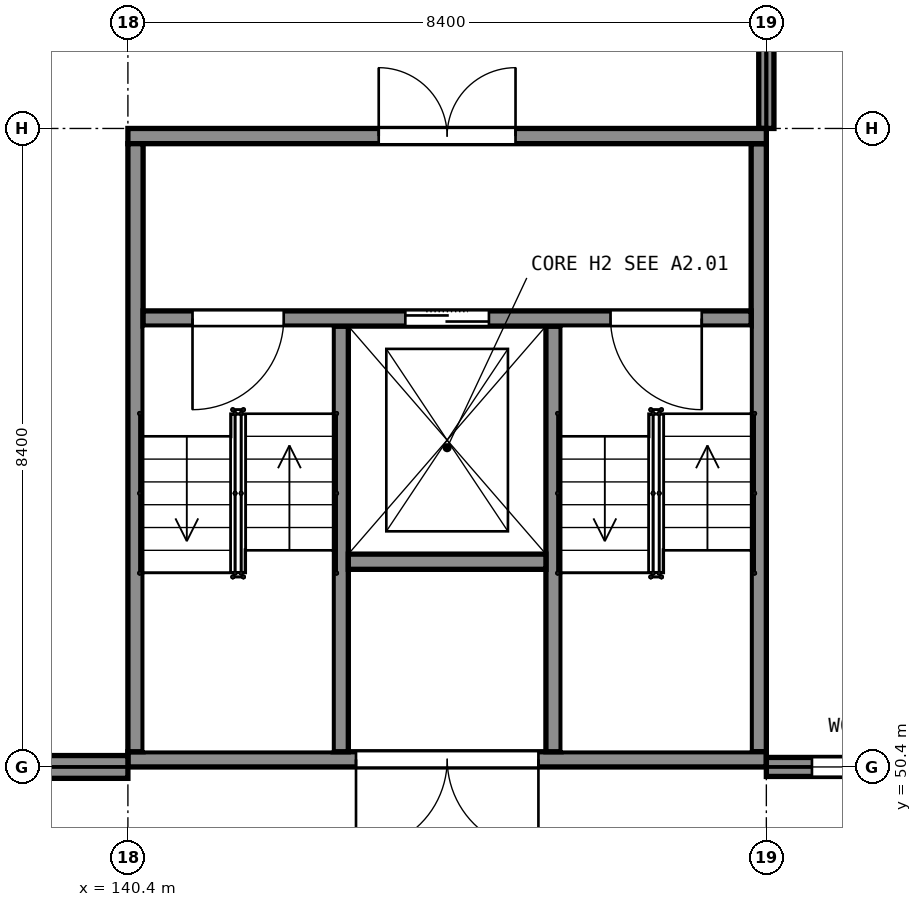
"""IFC4 building model, lengths in metres.
Left out: names, types, materials, properties, quantities, classifications, styles, units other than length and angle.
Written with IfcOpenShell. Run it as: python <this file> out.ifc"""

import sys

from ifc_helpers import new_model, si_unit, direction, frame, frame_2d, origin, place, context, subcontext, project, spatial, rectangle, extrude, element, fill, save


model = new_model("IFC4")
c1 = context("Model", 3, precision=1e-05, world=origin(), true_north=direction((0.0, 1.0)))
c2 = subcontext(c1, "Body", "Model", "MODEL_VIEW")
j1 = project(units=[si_unit("LENGTHUNIT", "METRE"), si_unit("PLANEANGLEUNIT", "RADIAN")], contexts=[c1])
p1 = place(None, origin())
s1 = spatial("IfcSite", under=j1, at=p1, CompositionType="ELEMENT")
p2 = place(p1, origin())
s2 = spatial("IfcBuilding", under=s1, at=p2, CompositionType="ELEMENT")
p3 = place(p2, origin())
s3 = spatial("IfcBuildingStorey", under=s2, at=p3, CompositionType="ELEMENT", Elevation=0.0)
p4 = place(p3, frame((148.8, 50.5, -1.8), z_axis=(0.0, 0.0, 1.0), x_axis=(-1.0, 0.0, 0.0)))
e1 = element("IfcWall", 1, at=p4, inside=s3, PredefinedType="SHEAR", context=c2, shape_type="SweptSolid", body=[
    extrude(rectangle(XDim=8.4, YDim=0.2, at=frame_2d((4.2, 0.0))), origin(), (0.0, 0.0, 1.0), 7.3),
])
p5 = place(p4, frame((2.999, 0.0, 1.8)))
e2 = element("IfcOpeningElement", 2, at=p5, cuts=e1, PredefinedType="OPENING", context=c2, shape_type="SweptSolid", body=[
    extrude(rectangle(XDim=2.4, YDim=2.1, at=frame_2d((1.2, 1.05))), frame((0.0, 0.11, 0.0), z_axis=(0.0, -1.0, 0.0), x_axis=(1.0, 0.0, 0.0)), (0.0, 0.0, 1.0), 0.22),
])
p6 = place(p3, frame((140.4, 58.7, -1.8), z_axis=(0.0, 0.0, 1.0), x_axis=(1.0, 0.0, 0.0)))
e3 = element("IfcWall", 3, at=p6, inside=s3, PredefinedType="SHEAR", context=c2, shape_type="SweptSolid", body=[
    extrude(rectangle(XDim=8.4, YDim=0.2, at=frame_2d((4.2, 0.0))), origin(), (0.0, 0.0, 1.0), 7.3),
])
p7 = place(p6, frame((3.3, 0.0, 1.8)))
e4 = element("IfcOpeningElement", 4, at=p7, cuts=e3, PredefinedType="OPENING", context=c2, shape_type="SweptSolid", body=[
    extrude(rectangle(XDim=1.8, YDim=2.1, at=frame_2d((0.9, 1.05))), frame((0.0, 0.11, 0.0), z_axis=(0.0, -1.0, 0.0), x_axis=(1.0, 0.0, 0.0)), (0.0, 0.0, 1.0), 0.22),
])
for number, where, z_axis, x_axis in (
    (5, (140.5, 50.6, -1.8), (0.0, 0.0, 1.0), (0.0, 1.0, 0.0)),
    (6, (148.7, 50.6, -1.8), (0.0, 0.0, 1.0), (0.0, 1.0, 0.0)),
):
    element("IfcWall", number, at=place(p3, frame(where, z_axis=z_axis, x_axis=x_axis)), inside=s3, PredefinedType="SHEAR", context=c2, shape_type="SweptSolid", body=[
        extrude(rectangle(XDim=8.0, YDim=0.2, at=frame_2d((4.0, 0.0))), origin(), (0.0, 0.0, 1.0), 7.3),
    ])
p8 = place(p3, frame((140.6, 56.3, -1.8), z_axis=(0.0, 0.0, 1.0), x_axis=(1.0, 0.0, 0.0)))
e7 = element("IfcWall", 7, at=p8, inside=s3, PredefinedType="SHEAR", context=c2, shape_type="SweptSolid", body=[
    extrude(rectangle(XDim=8.0, YDim=0.2, at=frame_2d((4.0, 0.0))), origin(), (0.0, 0.0, 1.0), 7.3),
])
p9 = place(p8, frame((0.65, 0.0, 1.8)))
e8 = element("IfcOpeningElement", 8, at=p9, cuts=e7, PredefinedType="OPENING", context=c2, shape_type="SweptSolid", body=[
    extrude(rectangle(XDim=1.2, YDim=2.1, at=frame_2d((0.6, 1.05))), frame((0.0, 0.11, 0.0), z_axis=(0.0, -1.0, 0.0), x_axis=(1.0, 0.0, 0.0)), (0.0, 0.0, 1.0), 0.22),
])
p10 = place(p8, frame((6.15, 0.0, 1.8)))
e9 = element("IfcOpeningElement", 9, at=p10, cuts=e7, PredefinedType="OPENING", context=c2, shape_type="SweptSolid", body=[
    extrude(rectangle(XDim=1.2, YDim=2.1, at=frame_2d((0.6, 1.05))), frame((0.0, 0.11, 0.0), z_axis=(0.0, -1.0, 0.0), x_axis=(1.0, 0.0, 0.0)), (0.0, 0.0, 1.0), 0.22),
])
p11 = place(p8, frame((3.45, 0.0, 1.8)))
e10 = element("IfcOpeningElement", 10, at=p11, cuts=e7, PredefinedType="OPENING", context=c2, shape_type="SweptSolid", body=[
    extrude(rectangle(XDim=1.1, YDim=2.1, at=frame_2d((0.55, 1.05))), frame((0.0, 0.11, 0.0), z_axis=(0.0, -1.0, 0.0), x_axis=(1.0, 0.0, 0.0)), (0.0, 0.0, 1.0), 0.22),
])
for number, where, z_axis, x_axis in (
    (11, (143.2, 50.6, -1.8), (0.0, 0.0, 1.0), (0.0, 1.0, 0.0)),
    (12, (146.0, 50.6, -1.8), (0.0, 0.0, 1.0), (0.0, 1.0, 0.0)),
):
    element("IfcWall", number, at=place(p3, frame(where, z_axis=z_axis, x_axis=x_axis)), inside=s3, PredefinedType="SHEAR", context=c2, shape_type="SweptSolid", body=[
        extrude(rectangle(XDim=5.6, YDim=0.2, at=frame_2d((2.8, 0.0))), origin(), (0.0, 0.0, 1.0), 7.3),
    ])
p12 = place(p3, frame((143.3, 53.1, -1.8), z_axis=(0.0, 0.0, 1.0), x_axis=(1.0, 0.0, 0.0)))
e13 = element("IfcWall", 13, at=p12, inside=s3, PredefinedType="SHEAR", context=c2, shape_type="SweptSolid", body=[
    extrude(rectangle(XDim=2.6, YDim=0.2, at=frame_2d((1.3, 0.0))), origin(), (0.0, 0.0, 1.0), 7.3),
])
p13 = place(p3, frame((132.4, 50.4, 0.0), z_axis=(0.0, 0.0, 1.0), x_axis=(1.0, 0.0, 0.0)))
e14 = element("IfcWall", 14, at=p13, inside=s3, PredefinedType="SOLIDWALL", context=c2, shape_type="SweptSolid", body=[
    extrude(rectangle(XDim=8.0, YDim=0.3, at=frame_2d((4.0, 0.0))), origin(), (0.0, 0.0, 1.0), 4.44),
])
p14 = place(p13, frame((2.3, 0.0, 1.5)))
e15 = element("IfcOpeningElement", 15, at=p14, cuts=e14, PredefinedType="OPENING", context=c2, shape_type="SweptSolid", body=[
    extrude(rectangle(XDim=0.6, YDim=2.4, at=frame_2d((0.3, 1.2))), frame((0.0, 0.16, 0.0), z_axis=(0.0, -1.0, 0.0), x_axis=(1.0, 0.0, 0.0)), (0.0, 0.0, 1.0), 0.32),
])
p15 = place(p13, frame((5.1, 0.0, 1.5)))
e16 = element("IfcOpeningElement", 16, at=p15, cuts=e14, PredefinedType="OPENING", context=c2, shape_type="SweptSolid", body=[
    extrude(rectangle(XDim=0.6, YDim=2.4, at=frame_2d((0.3, 1.2))), frame((0.0, 0.16, 0.0), z_axis=(0.0, -1.0, 0.0), x_axis=(1.0, 0.0, 0.0)), (0.0, 0.0, 1.0), 0.32),
])
p16 = place(p3, frame((148.8, 50.4, 0.0), z_axis=(0.0, 0.0, 1.0), x_axis=(1.0, 0.0, 0.0)))
e17 = element("IfcWall", 17, at=p16, inside=s3, PredefinedType="SOLIDWALL", context=c2, shape_type="SweptSolid", body=[
    extrude(rectangle(XDim=8.0, YDim=0.25, at=frame_2d((4.0, 0.0))), origin(), (0.0, 0.0, 1.0), 4.44),
])
p17 = place(p16, frame((0.6, 0.0, 0.9)))
e18 = element("IfcOpeningElement", 18, at=p17, cuts=e17, PredefinedType="OPENING", context=c2, shape_type="SweptSolid", body=[
    extrude(rectangle(XDim=1.2, YDim=2.1, at=frame_2d((0.6, 1.05))), frame((0.0, 0.135, 0.0), z_axis=(0.0, -1.0, 0.0), x_axis=(1.0, 0.0, 0.0)), (0.0, 0.0, 1.0), 0.27),
])
p18 = place(p16, frame((3.4, 0.0, 0.9)))
e19 = element("IfcOpeningElement", 19, at=p18, cuts=e17, PredefinedType="OPENING", context=c2, shape_type="SweptSolid", body=[
    extrude(rectangle(XDim=1.2, YDim=2.1, at=frame_2d((0.6, 1.05))), frame((0.0, 0.135, 0.0), z_axis=(0.0, -1.0, 0.0), x_axis=(1.0, 0.0, 0.0)), (0.0, 0.0, 1.0), 0.27),
])
p19 = place(p16, frame((6.2, 0.0, 0.9)))
e20 = element("IfcOpeningElement", 20, at=p19, cuts=e17, PredefinedType="OPENING", context=c2, shape_type="SweptSolid", body=[
    extrude(rectangle(XDim=1.2, YDim=2.1, at=frame_2d((0.6, 1.05))), frame((0.0, 0.135, 0.0), z_axis=(0.0, -1.0, 0.0), x_axis=(1.0, 0.0, 0.0)), (0.0, 0.0, 1.0), 0.27),
])
p20 = place(p3, frame((148.8, 58.8, 0.0), z_axis=(0.0, 0.0, 1.0), x_axis=(0.0, 1.0, 0.0)))
e21 = element("IfcWall", 21, at=p20, inside=s3, PredefinedType="PARTITIONING", context=c2, shape_type="SweptSolid", body=[
    extrude(rectangle(XDim=8.0, YDim=0.2, at=frame_2d((4.0, 0.0))), origin(), (0.0, 0.0, 1.0), 4.4),
])
p21 = place(p20, frame((1.025, 0.0, 0.0)))
e22 = element("IfcOpeningElement", 22, at=p21, cuts=e21, PredefinedType="OPENING", context=c2, shape_type="SweptSolid", body=[
    extrude(rectangle(XDim=2.4, YDim=2.4, at=frame_2d((1.2, 1.2))), frame((0.0, 0.11, 0.0), z_axis=(0.0, -1.0, 0.0), x_axis=(1.0, 0.0, 0.0)), (0.0, 0.0, 1.0), 0.22),
])
p22 = place(p17, origin())
e23 = element("IfcWindow", 23, at=p22, inside=s3, PartitioningType="SINGLE_PANEL", PredefinedType="WINDOW", context=c2, shape_type="SweptSolid", body=[
    extrude(rectangle(XDim=1.2, YDim=2.1, at=frame_2d((0.6, 1.05))), frame((0.0, 0.105, 0.0), z_axis=(0.0, -1.0, 0.0), x_axis=(1.0, 0.0, 0.0)), (0.0, 0.0, 1.0), 0.06),
])
fill(e18, e23)
p23 = place(p5, origin())
e24 = element("IfcDoor", 24, at=p23, inside=s3, OperationType="DOUBLE_DOOR_SINGLE_SWING", PredefinedType="DOOR", context=c2, shape_type="SweptSolid", body=[
    extrude(rectangle(XDim=2.4, YDim=2.1, at=frame_2d((1.2, 1.05))), frame((0.0, 0.025, 0.0), z_axis=(0.0, -1.0, 0.0), x_axis=(1.0, 0.0, 0.0)), (0.0, 0.0, 1.0), 0.05),
])
fill(e2, e24)
p24 = place(p7, origin())
e25 = element("IfcDoor", 25, at=p24, inside=s3, OperationType="DOUBLE_DOOR_SINGLE_SWING", PredefinedType="DOOR", context=c2, shape_type="SweptSolid", body=[
    extrude(rectangle(XDim=1.8, YDim=2.1, at=frame_2d((0.9, 1.05))), frame((0.0, 0.025, 0.0), z_axis=(0.0, -1.0, 0.0), x_axis=(1.0, 0.0, 0.0)), (0.0, 0.0, 1.0), 0.05),
])
fill(e4, e25)
p25 = place(p9, origin())
e26 = element("IfcDoor", 26, at=p25, inside=s3, OperationType="SINGLE_SWING_LEFT", PredefinedType="DOOR", context=c2, shape_type="SweptSolid", body=[
    extrude(rectangle(XDim=1.2, YDim=2.1, at=frame_2d((0.6, 1.05))), frame((0.0, 0.025, 0.0), z_axis=(0.0, -1.0, 0.0), x_axis=(1.0, 0.0, 0.0)), (0.0, 0.0, 1.0), 0.05),
])
fill(e8, e26)
p26 = place(p10, origin())
e27 = element("IfcDoor", 27, at=p26, inside=s3, OperationType="SINGLE_SWING_RIGHT", PredefinedType="DOOR", context=c2, shape_type="SweptSolid", body=[
    extrude(rectangle(XDim=1.2, YDim=2.1, at=frame_2d((0.6, 1.05))), frame((0.0, 0.025, 0.0), z_axis=(0.0, -1.0, 0.0), x_axis=(1.0, 0.0, 0.0)), (0.0, 0.0, 1.0), 0.05),
])
fill(e9, e27)
p27 = place(p11, origin())
e28 = element("IfcDoor", 28, at=p27, inside=s3, OperationType="DOUBLE_DOOR_SLIDING", PredefinedType="DOOR", context=c2, shape_type="SweptSolid", body=[
    extrude(rectangle(XDim=1.1, YDim=2.1, at=frame_2d((0.55, 1.05))), frame((0.0, 0.025, 0.0), z_axis=(0.0, -1.0, 0.0), x_axis=(1.0, 0.0, 0.0)), (0.0, 0.0, 1.0), 0.05),
])
fill(e10, e28)
save(model, sys.argv[1])
